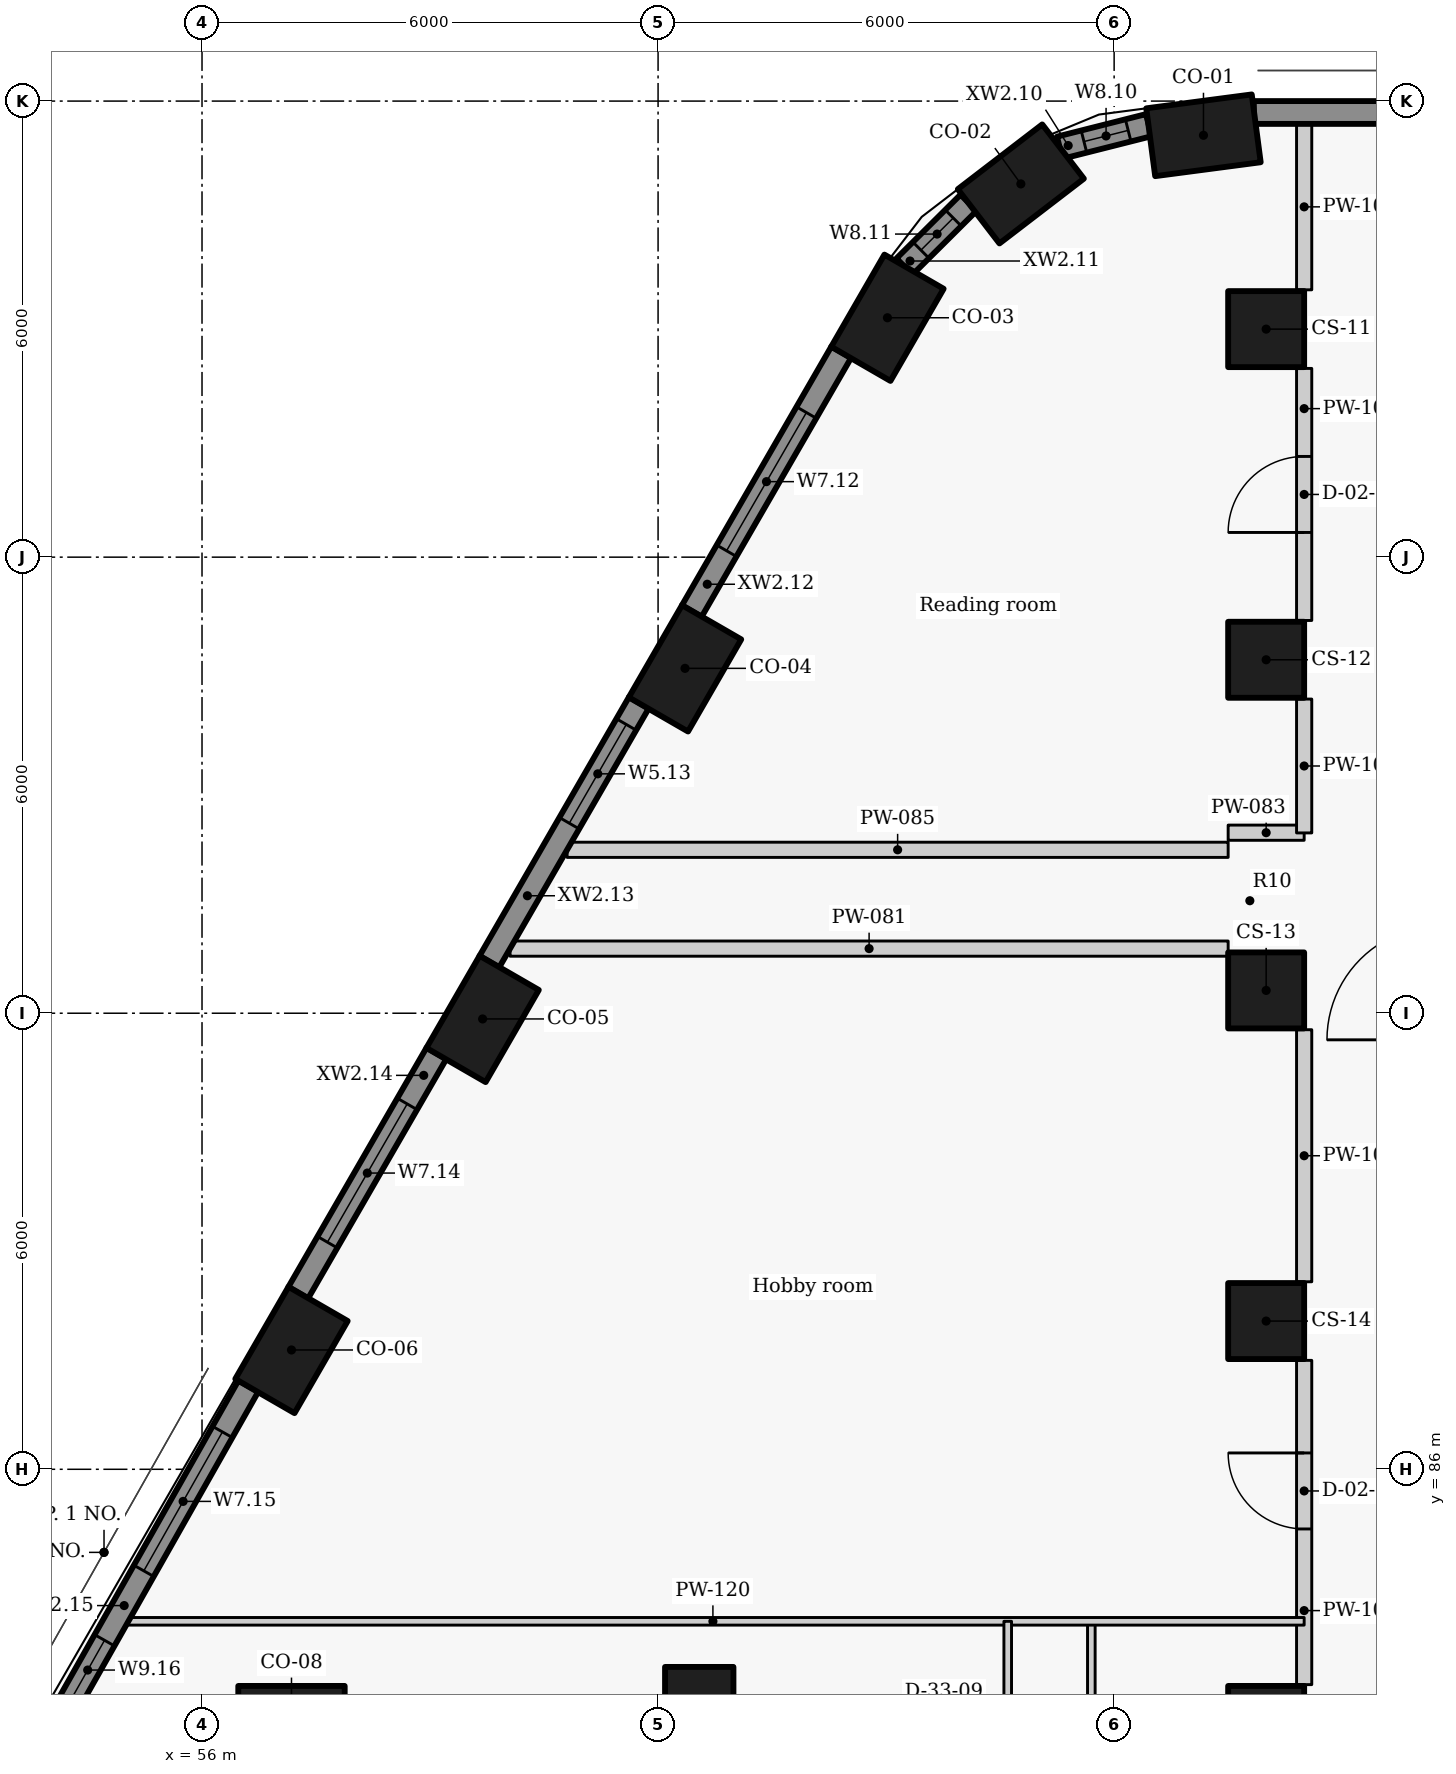
"""IFC4 building model, lengths in metres.
Left out: names, types, materials, properties, quantities, classifications, styles, units other than length and angle.
Written with IfcOpenShell. Run it as: python <this file> out.ifc"""

import sys

from ifc_helpers import new_model, si_unit, direction, frame, frame_2d, origin, origin_2d, place, context, subcontext, project, spatial, rectangle, extrude, element, fill, save


model = new_model("IFC4")
c1 = context("Model", 3, precision=1e-05, world=origin(), true_north=direction((0.0, 1.0)))
c2 = subcontext(c1, "Body", "Model", "MODEL_VIEW")
j1 = project(units=[si_unit("LENGTHUNIT", "METRE"), si_unit("PLANEANGLEUNIT", "RADIAN")], contexts=[c1])
p1 = place(None, origin())
s1 = spatial("IfcSite", under=j1, at=p1, CompositionType="ELEMENT")
p2 = place(p1, origin())
s2 = spatial("IfcBuilding", under=s1, at=p2, CompositionType="ELEMENT")
p3 = place(p2, frame((0.0, 0.0, 87.6)))
s3 = spatial("IfcBuildingStorey", under=s2, at=p3, CompositionType="ELEMENT", Elevation=87.6)
for number, where, z_axis, x_axis in (
    (1, (69.175, 103.55, 0.0), (0.0, 0.0, 1.0), (-0.991, -0.131, 0.0)),
    (2, (66.773, 102.91, 0.0), (0.0, 0.0, 1.0), (-0.793, -0.609, 0.0)),
    (3, (65.018, 101.149, 0.0), (0.0, 0.0, 1.0), (-0.5, -0.866, 0.0)),
    (4, (62.354, 96.537, 0.0), (0.0, 0.0, 1.0), (-0.5, -0.866, 0.0)),
    (5, (59.692, 91.925, 0.0), (0.0, 0.0, 1.0), (-0.5, -0.866, 0.0)),
    (6, (57.177, 87.57, 0.0), (0.0, 0.0, 1.0), (-0.5, -0.866, 0.0)),
    (7, (57.177, 82.7, 0.0), (0.0, 0.0, 1.0), (1.0, 0.0, 0.0)),
    (8, (62.542, 82.7, 0.0), (0.0, 0.0, 1.0), (0.0, -1.0, 0.0)),
):
    element("IfcColumn", number, at=place(p3, frame(where, z_axis=z_axis, x_axis=x_axis)), inside=s3, PredefinedType="COLUMN", context=c2, shape_type="SweptSolid", body=[
        extrude(rectangle(XDim=1.4, YDim=0.9, at=origin_2d()), origin(), (0.0, 0.0, 1.0), 3.3),
    ])
for number, where, z_axis, x_axis in (
    (9, (70.0, 101.0, 0.0), (0.0, 0.0, 1.0), (0.0, -1.0, 0.0)),
    (10, (70.0, 96.65, 0.0), (0.0, 0.0, 1.0), (0.0, -1.0, 0.0)),
    (11, (70.0, 92.3, 0.0), (0.0, 0.0, 1.0), (0.0, -1.0, 0.0)),
    (12, (70.0, 87.95, 0.0), (0.0, 0.0, 1.0), (0.0, -1.0, 0.0)),
    (13, (70.0, 82.65, 0.0), (0.0, 0.0, 1.0), (0.0, -1.0, 0.0)),
):
    element("IfcColumn", number, at=place(p3, frame(where, z_axis=z_axis, x_axis=x_axis)), inside=s3, PredefinedType="COLUMN", context=c2, shape_type="SweptSolid", body=[
        extrude(rectangle(XDim=1.0, YDim=1.0, at=origin_2d()), origin(), (0.0, 0.0, 1.0), 3.3),
    ])
p4 = place(p3, frame((90.129, 103.85, 0.0), z_axis=(0.0, 0.0, 1.0), x_axis=(-1.0, 0.0, 0.0)))
e14 = element("IfcWall", 14, at=p4, inside=s3, PredefinedType="SOLIDWALL", context=c2, shape_type="SweptSolid", body=[
    extrude(rectangle(XDim=20.291, YDim=0.3, at=frame_2d((10.146, 0.0))), origin(), (0.0, 0.0, 1.0), 2.425),
])
p5 = place(p3, frame((68.456, 103.683, 0.0), z_axis=(0.0, 0.0, 1.0), x_axis=(-0.969485113966, -0.245150186208, 0.0)))
e15 = element("IfcWall", 15, at=p5, inside=s3, PredefinedType="SOLIDWALL", context=c2, shape_type="SweptSolid", body=[
    extrude(rectangle(XDim=1.208, YDim=0.3, at=frame_2d((0.604, 0.0))), origin(), (0.0, 0.0, 1.0), 2.425),
])
p6 = place(p5, frame((0.28, 0.0, 0.9)))
e16 = element("IfcOpeningElement", 16, at=p6, cuts=e15, PredefinedType="OPENING", context=c2, shape_type="SweptSolid", body=[
    extrude(rectangle(XDim=0.6, YDim=1.1, at=frame_2d((0.3, 0.55))), frame((0.0, 0.16, 0.0), z_axis=(0.0, -1.0, 0.0), x_axis=(1.0, 0.0, 0.0)), (0.0, 0.0, 1.0), 0.32),
])
p7 = place(p3, frame((66.085, 102.663, 0.0), z_axis=(0.0, 0.0, 1.0), x_axis=(-0.708951665509, -0.705257070842, 0.0)))
e17 = element("IfcWall", 17, at=p7, inside=s3, PredefinedType="SOLIDWALL", context=c2, shape_type="SweptSolid", body=[
    extrude(rectangle(XDim=1.189, YDim=0.3, at=frame_2d((0.595, 0.0))), origin(), (0.0, 0.0, 1.0), 2.425),
])
p8 = place(p7, frame((0.284, 0.0, 0.9)))
e18 = element("IfcOpeningElement", 18, at=p8, cuts=e17, PredefinedType="OPENING", context=c2, shape_type="SweptSolid", body=[
    extrude(rectangle(XDim=0.6, YDim=1.1, at=frame_2d((0.3, 0.55))), frame((0.0, 0.16, 0.0), z_axis=(0.0, -1.0, 0.0), x_axis=(1.0, 0.0, 0.0)), (0.0, 0.0, 1.0), 0.32),
])
p9 = place(p3, frame((64.41, 100.697, 0.0), z_axis=(0.0, 0.0, 1.0), x_axis=(-0.500003583557, -0.866023334807, 0.0)))
e19 = element("IfcWall", 19, at=p9, inside=s3, PredefinedType="SOLIDWALL", context=c2, shape_type="SweptSolid", body=[
    extrude(rectangle(XDim=3.934, YDim=0.3, at=frame_2d((1.967, 0.0))), origin(), (0.0, 0.0, 1.0), 2.425),
])
p10 = place(p9, frame((0.917, 0.0, 0.9)))
e20 = element("IfcOpeningElement", 20, at=p10, cuts=e19, PredefinedType="OPENING", context=c2, shape_type="SweptSolid", body=[
    extrude(rectangle(XDim=2.1, YDim=1.1, at=frame_2d((1.05, 0.55))), frame((0.0, 0.16, 0.0), z_axis=(0.0, -1.0, 0.0), x_axis=(1.0, 0.0, 0.0)), (0.0, 0.0, 1.0), 0.32),
])
p11 = place(p3, frame((61.747, 96.084, 0.0), z_axis=(0.0, 0.0, 1.0), x_axis=(-0.499957037901, -0.866050206543, 0.0)))
e21 = element("IfcWall", 21, at=p11, inside=s3, PredefinedType="SOLIDWALL", context=c2, shape_type="SweptSolid", body=[
    extrude(rectangle(XDim=3.934, YDim=0.3, at=frame_2d((1.967, 0.0))), origin(), (0.0, 0.0, 1.0), 2.425),
])
p12 = place(p11, frame((0.33, 0.0, 0.9)))
e22 = element("IfcOpeningElement", 22, at=p12, cuts=e21, PredefinedType="OPENING", context=c2, shape_type="SweptSolid", body=[
    extrude(rectangle(XDim=1.5, YDim=1.1, at=frame_2d((0.75, 0.55))), frame((0.0, 0.16, 0.0), z_axis=(0.0, -1.0, 0.0), x_axis=(1.0, 0.0, 0.0)), (0.0, 0.0, 1.0), 0.32),
])
p13 = place(p3, frame((59.084, 91.472, 0.0), z_axis=(0.0, 0.0, 1.0), x_axis=(-0.500009139881, -0.866020126807, 0.0)))
e23 = element("IfcWall", 23, at=p13, inside=s3, PredefinedType="SOLIDWALL", context=c2, shape_type="SweptSolid", body=[
    extrude(rectangle(XDim=3.637, YDim=0.3, at=frame_2d((1.818, 0.0))), origin(), (0.0, 0.0, 1.0), 2.425),
])
p14 = place(p13, frame((0.768, 0.0, 0.9)))
e24 = element("IfcOpeningElement", 24, at=p14, cuts=e23, PredefinedType="OPENING", context=c2, shape_type="SweptSolid", body=[
    extrude(rectangle(XDim=2.1, YDim=1.1, at=frame_2d((1.05, 0.55))), frame((0.0, 0.16, 0.0), z_axis=(0.0, -1.0, 0.0), x_axis=(1.0, 0.0, 0.0)), (0.0, 0.0, 1.0), 0.32),
])
p15 = place(p3, frame((56.609, 87.094, 0.0), z_axis=(0.0, 0.0, 1.0), x_axis=(-0.492456858874, -0.870336855561, 0.0)))
e25 = element("IfcWall", 25, at=p15, inside=s3, PredefinedType="SOLIDWALL", context=c2, shape_type="SweptSolid", body=[
    extrude(rectangle(XDim=5.677, YDim=0.3, at=frame_2d((2.838, 0.0))), origin(), (0.0, 0.0, 1.0), 2.425),
])
p16 = place(p15, frame((0.692, 0.0, 0.9)))
e26 = element("IfcOpeningElement", 26, at=p16, cuts=e25, PredefinedType="OPENING", context=c2, shape_type="SweptSolid", body=[
    extrude(rectangle(XDim=2.1, YDim=1.1, at=frame_2d((1.05, 0.55))), frame((0.0, 0.16, 0.0), z_axis=(0.0, -1.0, 0.0), x_axis=(1.0, 0.0, 0.0)), (0.0, 0.0, 1.0), 0.32),
])
p17 = place(p15, frame((3.842, 0.0, 0.9)))
e27 = element("IfcOpeningElement", 27, at=p17, cuts=e25, PredefinedType="OPENING", context=c2, shape_type="SweptSolid", body=[
    extrude(rectangle(XDim=0.9, YDim=1.1, at=frame_2d((0.45, 0.55))), frame((0.0, 0.16, 0.0), z_axis=(0.0, -1.0, 0.0), x_axis=(1.0, 0.0, 0.0)), (0.0, 0.0, 1.0), 0.32),
])
p18 = place(p3, frame((60.052, 92.85, 0.0), z_axis=(0.0, 0.0, 1.0), x_axis=(1.0, 0.0, 0.0)))
e28 = element("IfcWall", 28, at=p18, inside=s3, PredefinedType="PARTITIONING", context=c2, shape_type="SweptSolid", body=[
    extrude(rectangle(XDim=9.448, YDim=0.2, at=frame_2d((4.724, 0.0))), origin(), (0.0, 0.0, 1.0), 2.405),
])
p19 = place(p3, frame((69.5, 94.375, 0.0), z_axis=(0.0, 0.0, 1.0), x_axis=(1.0, 0.0, 0.0)))
e29 = element("IfcWall", 29, at=p19, inside=s3, PredefinedType="PARTITIONING", context=c2, shape_type="SweptSolid", body=[
    extrude(rectangle(XDim=1.0, YDim=0.2, at=frame_2d((0.5, 0.0))), origin(), (0.0, 0.0, 1.0), 2.505),
])
p20 = place(p3, frame((60.803, 94.15, 0.0), z_axis=(0.0, 0.0, 1.0), x_axis=(1.0, 0.0, 0.0)))
e30 = element("IfcWall", 30, at=p20, inside=s3, PredefinedType="PARTITIONING", context=c2, shape_type="SweptSolid", body=[
    extrude(rectangle(XDim=8.697, YDim=0.2, at=frame_2d((4.349, 0.0))), origin(), (0.0, 0.0, 1.0), 2.405),
])
p21 = place(p3, frame((70.5, 83.167, 0.0), z_axis=(0.0, 0.0, 1.0), x_axis=(0.0, 1.0, 0.0)))
e31 = element("IfcWall", 31, at=p21, inside=s3, PredefinedType="PARTITIONING", context=c2, shape_type="SweptSolid", body=[
    extrude(rectangle(XDim=4.266, YDim=0.2, at=frame_2d((2.133, 0.0))), origin(), (0.0, 0.0, 1.0), 3.025),
])
p22 = place(p21, frame((2.048, 0.0, 0.0)))
e32 = element("IfcOpeningElement", 32, at=p22, cuts=e31, PredefinedType="OPENING", context=c2, shape_type="SweptSolid", body=[
    extrude(rectangle(XDim=1.0, YDim=2.1, at=frame_2d((0.5, 1.05))), frame((0.0, 0.11, 0.0), z_axis=(0.0, -1.0, 0.0), x_axis=(1.0, 0.0, 0.0)), (0.0, 0.0, 1.0), 0.22),
])
p23 = place(p3, frame((70.5, 88.467, 0.0), z_axis=(0.0, 0.0, 1.0), x_axis=(0.0, 1.0, 0.0)))
e33 = element("IfcWall", 33, at=p23, inside=s3, PredefinedType="PARTITIONING", context=c2, shape_type="SweptSolid", body=[
    extrude(rectangle(XDim=3.316, YDim=0.2, at=frame_2d((1.658, 0.0))), origin(), (0.0, 0.0, 1.0), 3.025),
])
p24 = place(p3, frame((70.5, 94.372, 0.0), z_axis=(0.0, 0.0, 1.0), x_axis=(0.0, 1.0, 0.0)))
e34 = element("IfcWall", 34, at=p24, inside=s3, PredefinedType="PARTITIONING", context=c2, shape_type="SweptSolid", body=[
    extrude(rectangle(XDim=1.761, YDim=0.2, at=frame_2d((0.88, 0.0))), origin(), (0.0, 0.0, 1.0), 3.025),
])
p25 = place(p3, frame((70.5, 97.167, 0.0), z_axis=(0.0, 0.0, 1.0), x_axis=(0.0, 1.0, 0.0)))
e35 = element("IfcWall", 35, at=p25, inside=s3, PredefinedType="PARTITIONING", context=c2, shape_type="SweptSolid", body=[
    extrude(rectangle(XDim=3.316, YDim=0.2, at=frame_2d((1.658, 0.0))), origin(), (0.0, 0.0, 1.0), 3.025),
])
p26 = place(p25, frame((1.158, 0.0, 0.0)))
e36 = element("IfcOpeningElement", 36, at=p26, cuts=e35, PredefinedType="OPENING", context=c2, shape_type="SweptSolid", body=[
    extrude(rectangle(XDim=1.0, YDim=2.1, at=frame_2d((0.5, 1.05))), frame((0.0, 0.11, 0.0), z_axis=(0.0, -1.0, 0.0), x_axis=(1.0, 0.0, 0.0)), (0.0, 0.0, 1.0), 0.22),
])
p27 = place(p3, frame((70.5, 101.517, 0.0), z_axis=(0.0, 0.0, 1.0), x_axis=(0.0, 1.0, 0.0)))
e37 = element("IfcWall", 37, at=p27, inside=s3, PredefinedType="PARTITIONING", context=c2, shape_type="SweptSolid", body=[
    extrude(rectangle(XDim=2.183, YDim=0.2, at=frame_2d((1.091, 0.0))), origin(), (0.0, 0.0, 1.0), 3.025),
])
p28 = place(p3, frame((67.7, 84.0, 0.0), z_axis=(0.0, 0.0, 1.0), x_axis=(0.0, -1.0, 0.0)))
e38 = element("IfcWall", 38, at=p28, inside=s3, PredefinedType="PARTITIONING", context=c2, shape_type="SweptSolid", body=[
    extrude(rectangle(XDim=12.9, YDim=0.1, at=frame_2d((6.45, 0.0))), origin(), (0.0, 0.0, 1.0), 3.025),
])
p29 = place(p28, frame((10.459, 0.0, 0.0)))
e39 = element("IfcOpeningElement", 39, at=p29, cuts=e38, PredefinedType="OPENING", context=c2, shape_type="SweptSolid", body=[
    extrude(rectangle(XDim=0.85, YDim=2.1, at=frame_2d((0.425, 1.05))), frame((0.0, 0.06, 0.0), z_axis=(0.0, -1.0, 0.0), x_axis=(1.0, 0.0, 0.0)), (0.0, 0.0, 1.0), 0.12),
])
p30 = place(p28, frame((6.428, 0.0, 0.0)))
e40 = element("IfcOpeningElement", 40, at=p30, cuts=e38, PredefinedType="OPENING", context=c2, shape_type="SweptSolid", body=[
    extrude(rectangle(XDim=0.85, YDim=2.1, at=frame_2d((0.425, 1.05))), frame((0.0, 0.06, 0.0), z_axis=(0.0, -1.0, 0.0), x_axis=(1.0, 0.0, 0.0)), (0.0, 0.0, 1.0), 0.12),
])
p31 = place(p28, frame((1.969, 0.0, 0.0)))
e41 = element("IfcOpeningElement", 41, at=p31, cuts=e38, PredefinedType="OPENING", context=c2, shape_type="SweptSolid", body=[
    extrude(rectangle(XDim=0.9, YDim=2.1, at=frame_2d((0.45, 1.05))), frame((0.0, 0.06, 0.0), z_axis=(0.0, -1.0, 0.0), x_axis=(1.0, 0.0, 0.0)), (0.0, 0.0, 1.0), 0.12),
])
p32 = place(p3, frame((54.943, 84.0, 0.0), z_axis=(0.0, 0.0, 1.0), x_axis=(1.0, 0.0, 0.0)))
e42 = element("IfcWall", 42, at=p32, inside=s3, PredefinedType="PARTITIONING", context=c2, shape_type="SweptSolid", body=[
    extrude(rectangle(XDim=15.557, YDim=0.1, at=frame_2d((7.778, 0.0))), origin(), (0.0, 0.0, 1.0), 2.405),
])
p33 = place(p3, frame((66.6, 69.5, 0.0), z_axis=(0.0, 0.0, 1.0), x_axis=(0.0, 1.0, 0.0)))
e43 = element("IfcWall", 43, at=p33, inside=s3, PredefinedType="PARTITIONING", context=c2, shape_type="SweptSolid", body=[
    extrude(rectangle(XDim=14.5, YDim=0.1, at=frame_2d((7.25, 0.0))), origin(), (0.0, 0.0, 1.0), 3.025),
])
p34 = place(p33, frame((1.141, 0.0, 0.0)))
e44 = element("IfcOpeningElement", 44, at=p34, cuts=e43, PredefinedType="OPENING", context=c2, shape_type="SweptSolid", body=[
    extrude(rectangle(XDim=0.9, YDim=2.1, at=frame_2d((0.45, 1.05))), frame((0.0, 0.06, 0.0), z_axis=(0.0, -1.0, 0.0), x_axis=(1.0, 0.0, 0.0)), (0.0, 0.0, 1.0), 0.12),
])
p35 = place(p33, frame((4.324, 0.0, 0.0)))
e45 = element("IfcOpeningElement", 45, at=p35, cuts=e43, PredefinedType="OPENING", context=c2, shape_type="SweptSolid", body=[
    extrude(rectangle(XDim=0.9, YDim=2.1, at=frame_2d((0.45, 1.05))), frame((0.0, 0.06, 0.0), z_axis=(0.0, -1.0, 0.0), x_axis=(1.0, 0.0, 0.0)), (0.0, 0.0, 1.0), 0.12),
])
p36 = place(p33, frame((8.391, 0.0, 0.0)))
e46 = element("IfcOpeningElement", 46, at=p36, cuts=e43, PredefinedType="OPENING", context=c2, shape_type="SweptSolid", body=[
    extrude(rectangle(XDim=0.9, YDim=2.1, at=frame_2d((0.45, 1.05))), frame((0.0, 0.06, 0.0), z_axis=(0.0, -1.0, 0.0), x_axis=(1.0, 0.0, 0.0)), (0.0, 0.0, 1.0), 0.12),
])
p37 = place(p33, frame((12.459, 0.0, 0.0)))
e47 = element("IfcOpeningElement", 47, at=p37, cuts=e43, PredefinedType="OPENING", context=c2, shape_type="SweptSolid", body=[
    extrude(rectangle(XDim=0.9, YDim=2.1, at=frame_2d((0.45, 1.05))), frame((0.0, 0.06, 0.0), z_axis=(0.0, -1.0, 0.0), x_axis=(1.0, 0.0, 0.0)), (0.0, 0.0, 1.0), 0.12),
])
p38 = place(p6, origin())
e48 = element("IfcWindow", 48, at=p38, inside=s3, PartitioningType="SINGLE_PANEL", PredefinedType="WINDOW", context=c2, shape_type="SweptSolid", body=[
    extrude(rectangle(XDim=0.6, YDim=1.1, at=frame_2d((0.3, 0.55))), frame((0.0, 0.03, 0.0), z_axis=(0.0, -1.0, 0.0), x_axis=(1.0, 0.0, 0.0)), (0.0, 0.0, 1.0), 0.06),
])
fill(e16, e48)
p39 = place(p8, origin())
e49 = element("IfcWindow", 49, at=p39, inside=s3, PartitioningType="SINGLE_PANEL", PredefinedType="WINDOW", context=c2, shape_type="SweptSolid", body=[
    extrude(rectangle(XDim=0.6, YDim=1.1, at=frame_2d((0.3, 0.55))), frame((0.0, 0.03, 0.0), z_axis=(0.0, -1.0, 0.0), x_axis=(1.0, 0.0, 0.0)), (0.0, 0.0, 1.0), 0.06),
])
fill(e18, e49)
p40 = place(p10, origin())
e50 = element("IfcWindow", 50, at=p40, inside=s3, PartitioningType="SINGLE_PANEL", PredefinedType="WINDOW", context=c2, shape_type="SweptSolid", body=[
    extrude(rectangle(XDim=2.1, YDim=1.1, at=frame_2d((1.05, 0.55))), frame((0.0, 0.03, 0.0), z_axis=(0.0, -1.0, 0.0), x_axis=(1.0, 0.0, 0.0)), (0.0, 0.0, 1.0), 0.06),
])
fill(e20, e50)
p41 = place(p12, origin())
e51 = element("IfcWindow", 51, at=p41, inside=s3, PartitioningType="SINGLE_PANEL", PredefinedType="WINDOW", context=c2, shape_type="SweptSolid", body=[
    extrude(rectangle(XDim=1.5, YDim=1.1, at=frame_2d((0.75, 0.55))), frame((0.0, 0.03, 0.0), z_axis=(0.0, -1.0, 0.0), x_axis=(1.0, 0.0, 0.0)), (0.0, 0.0, 1.0), 0.06),
])
fill(e22, e51)
p42 = place(p14, origin())
e52 = element("IfcWindow", 52, at=p42, inside=s3, PartitioningType="SINGLE_PANEL", PredefinedType="WINDOW", context=c2, shape_type="SweptSolid", body=[
    extrude(rectangle(XDim=2.1, YDim=1.1, at=frame_2d((1.05, 0.55))), frame((0.0, 0.03, 0.0), z_axis=(0.0, -1.0, 0.0), x_axis=(1.0, 0.0, 0.0)), (0.0, 0.0, 1.0), 0.06),
])
fill(e24, e52)
p43 = place(p16, origin())
e53 = element("IfcWindow", 53, at=p43, inside=s3, PartitioningType="SINGLE_PANEL", PredefinedType="WINDOW", context=c2, shape_type="SweptSolid", body=[
    extrude(rectangle(XDim=2.1, YDim=1.1, at=frame_2d((1.05, 0.55))), frame((0.0, 0.03, 0.0), z_axis=(0.0, -1.0, 0.0), x_axis=(1.0, 0.0, 0.0)), (0.0, 0.0, 1.0), 0.06),
])
fill(e26, e53)
p44 = place(p17, origin())
e54 = element("IfcWindow", 54, at=p44, inside=s3, PartitioningType="SINGLE_PANEL", PredefinedType="WINDOW", context=c2, shape_type="SweptSolid", body=[
    extrude(rectangle(XDim=0.9, YDim=1.1, at=frame_2d((0.45, 0.55))), frame((0.0, 0.03, 0.0), z_axis=(0.0, -1.0, 0.0), x_axis=(1.0, 0.0, 0.0)), (0.0, 0.0, 1.0), 0.06),
])
fill(e27, e54)
p45 = place(p22, origin())
e55 = element("IfcDoor", 55, at=p45, inside=s3, OperationType="SINGLE_SWING_RIGHT", PredefinedType="DOOR", context=c2, shape_type="SweptSolid", body=[
    extrude(rectangle(XDim=1.0, YDim=2.1, at=frame_2d((0.5, 1.05))), frame((0.0, 0.025, 0.0), z_axis=(0.0, -1.0, 0.0), x_axis=(1.0, 0.0, 0.0)), (0.0, 0.0, 1.0), 0.05),
])
fill(e32, e55)
p46 = place(p26, origin())
e56 = element("IfcDoor", 56, at=p46, inside=s3, OperationType="SINGLE_SWING_LEFT", PredefinedType="DOOR", context=c2, shape_type="SweptSolid", body=[
    extrude(rectangle(XDim=1.0, YDim=2.1, at=frame_2d((0.5, 1.05))), frame((0.0, 0.025, 0.0), z_axis=(0.0, -1.0, 0.0), x_axis=(1.0, 0.0, 0.0)), (0.0, 0.0, 1.0), 0.05),
])
fill(e36, e56)
save(model, sys.argv[1])
